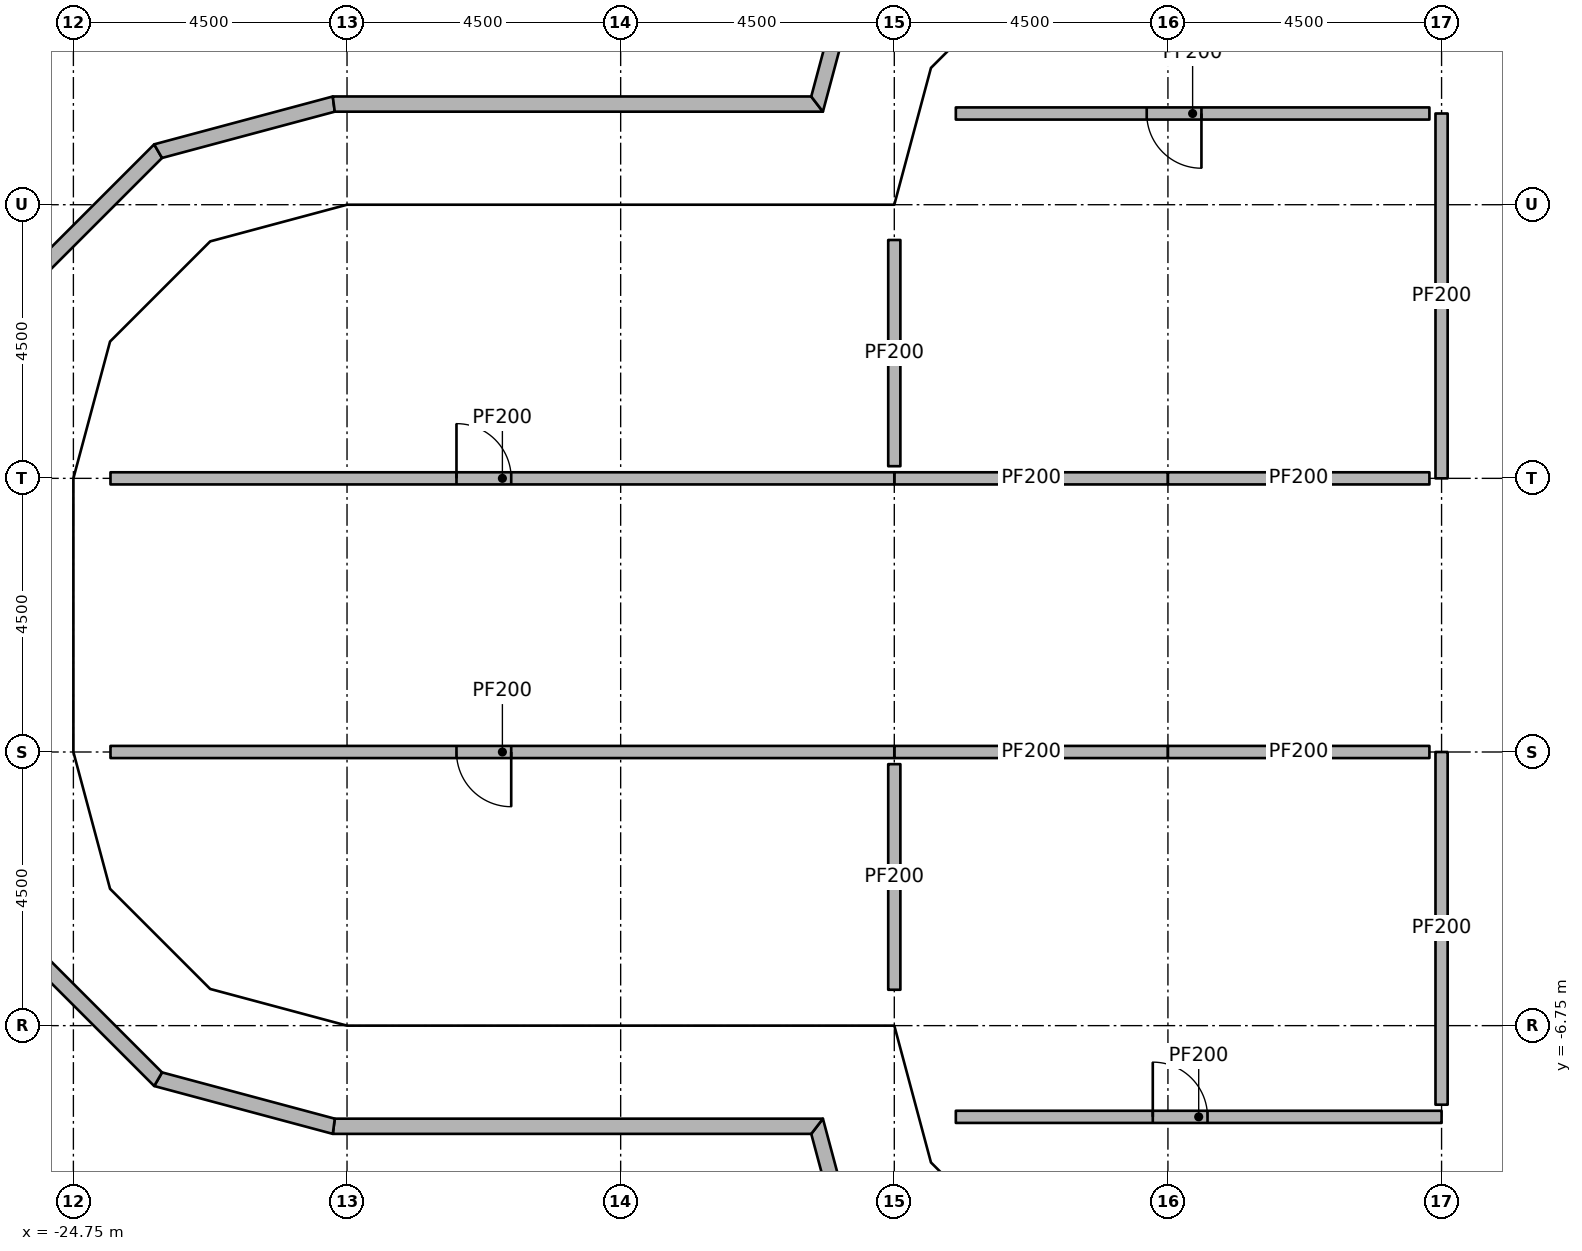
"""IFC4 building model, lengths in metres.
Left out: names, types, materials, properties, quantities, classifications, styles, units other than length and angle.
Written with IfcOpenShell. Run it as: python <this file> out.ifc"""

import sys

from ifc_helpers import new_model, si_unit, direction, frame, frame_2d, origin, origin_2d, place, context, subcontext, project, spatial, polyline, rectangle, outline, extrude, element, fill, save


model = new_model("IFC4")
c1 = context("Model", 3, precision=1e-05, world=origin(), true_north=direction((0.0, 1.0)))
c2 = subcontext(c1, "Body", "Model", "MODEL_VIEW")
j1 = project(units=[si_unit("LENGTHUNIT", "METRE"), si_unit("PLANEANGLEUNIT", "RADIAN")], contexts=[c1])
p1 = place(None, origin())
s1 = spatial("IfcSite", under=j1, at=p1, CompositionType="ELEMENT")
p2 = place(p1, origin())
s2 = spatial("IfcBuilding", under=s1, at=p2, CompositionType="ELEMENT")
p3 = place(p2, frame((0.0, 0.0, 295.2)))
s3 = spatial("IfcBuildingStorey", under=s2, at=p3, CompositionType="ELEMENT", Elevation=295.2)
for number, where, z_axis, x_axis in (
    (1, (-20.25, -6.11, 0.0), (0.0, 0.0, 1.0), (1.0, 0.0, 0.0)),
    (2, (-20.25, 6.11, 0.0), (0.0, 0.0, 1.0), (1.0, 0.0, 0.0)),
    (3, (-15.75, -6.25, 0.0), (0.0, 0.0, 1.0), (1.0, 0.0, 0.0)),
    (4, (-15.75, 6.25, 0.0), (0.0, 0.0, 1.0), (1.0, 0.0, 0.0)),
    (5, (-10.75, -6.25, 0.0), (0.0, 0.0, 1.0), (1.0, 0.0, 0.0)),
    (6, (-10.75, 6.25, 0.0), (0.0, 0.0, 1.0), (1.0, 0.0, 0.0)),
    (7, (-6.25, -6.25, 0.0), (0.0, 0.0, 1.0), (1.0, 0.0, 0.0)),
    (8, (-6.25, 6.25, 0.0), (0.0, 0.0, 1.0), (1.0, 0.0, 0.0)),
):
    element("IfcColumn", number, at=place(p3, frame(where, z_axis=z_axis, x_axis=x_axis)), inside=s3, PredefinedType="COLUMN", context=c2, shape_type="SweptSolid", body=[
        extrude(rectangle(XDim=0.6, YDim=0.6, at=origin_2d()), origin(), (0.0, 0.0, 1.0), 3.45),
    ])
p4 = place(p3, origin())
e9 = element("IfcWall", 9, at=p4, inside=s3, PredefinedType="PARAPET", context=c2, shape_type="SweptSolid", body=[
    extrude(outline(polyline([(-12.243, -9.921), (-12.616, -8.53), (-12.424, -8.28), (-12.019, -9.792), (-12.243, -9.921)])), origin(), (0.0, 0.0, 1.0), 1.22),
])
p5 = place(p3, origin())
e10 = element("IfcWall", 10, at=p5, inside=s3, PredefinedType="PARAPET", context=c2, shape_type="SweptSolid", body=[
    extrude(outline(polyline([(-12.616, -8.53), (-20.484, -8.53), (-20.451, -8.28), (-12.424, -8.28), (-12.616, -8.53)])), origin(), (0.0, 0.0, 1.0), 1.22),
])
p6 = place(p3, origin())
e11 = element("IfcWall", 11, at=p6, inside=s3, PredefinedType="PARAPET", context=c2, shape_type="SweptSolid", body=[
    extrude(outline(polyline([(-20.484, -8.53), (-23.421, -7.743), (-23.292, -7.519), (-20.451, -8.28), (-20.484, -8.53)])), origin(), (0.0, 0.0, 1.0), 1.22),
])
p7 = place(p3, origin())
e12 = element("IfcWall", 12, at=p7, inside=s3, PredefinedType="PARAPET", context=c2, shape_type="SweptSolid", body=[
    extrude(outline(polyline([(-23.421, -7.743), (-25.743, -5.421), (-25.519, -5.292), (-23.292, -7.519), (-23.421, -7.743)])), origin(), (0.0, 0.0, 1.0), 1.22),
])
p8 = place(p3, origin())
e13 = element("IfcWall", 13, at=p8, inside=s3, PredefinedType="PARAPET", context=c2, shape_type="SweptSolid", body=[
    extrude(outline(polyline([(-25.743, 5.421), (-23.421, 7.743), (-23.292, 7.519), (-25.519, 5.292), (-25.743, 5.421)])), origin(), (0.0, 0.0, 1.0), 1.22),
])
p9 = place(p3, origin())
e14 = element("IfcWall", 14, at=p9, inside=s3, PredefinedType="PARAPET", context=c2, shape_type="SweptSolid", body=[
    extrude(outline(polyline([(-23.421, 7.743), (-20.484, 8.53), (-20.451, 8.28), (-23.292, 7.519), (-23.421, 7.743)])), origin(), (0.0, 0.0, 1.0), 1.22),
])
p10 = place(p3, origin())
e15 = element("IfcWall", 15, at=p10, inside=s3, PredefinedType="PARAPET", context=c2, shape_type="SweptSolid", body=[
    extrude(outline(polyline([(-20.484, 8.53), (-12.616, 8.53), (-12.424, 8.28), (-20.451, 8.28), (-20.484, 8.53)])), origin(), (0.0, 0.0, 1.0), 1.22),
])
p11 = place(p3, origin())
e16 = element("IfcWall", 16, at=p11, inside=s3, PredefinedType="PARAPET", context=c2, shape_type="SweptSolid", body=[
    extrude(outline(polyline([(-12.616, 8.53), (-12.243, 9.921), (-12.019, 9.792), (-12.424, 8.28), (-12.616, 8.53)])), origin(), (0.0, 0.0, 1.0), 1.22),
])
p12 = place(p3, frame((-2.25, 2.25, 0.0), z_axis=(0.0, 0.0, 1.0), x_axis=(0.0, 1.0, 0.0)))
e17 = element("IfcWall", 17, at=p12, inside=s3, PredefinedType="PARTITIONING", context=c2, shape_type="SweptSolid", body=[
    extrude(rectangle(XDim=6.0, YDim=0.2, at=frame_2d((3.0, 0.0))), origin(), (0.0, 0.0, 1.0), 2.681),
])
p13 = place(p3, frame((-2.45, 8.25, 0.0), z_axis=(0.0, 0.0, 1.0), x_axis=(-1.0, 0.0, 0.0)))
e18 = element("IfcWall", 18, at=p13, inside=s3, PredefinedType="PARTITIONING", context=c2, shape_type="SweptSolid", body=[
    extrude(rectangle(XDim=7.788, YDim=0.2, at=frame_2d((3.894, 0.0))), origin(), (0.0, 0.0, 1.0), 3.45),
])
p14 = place(p13, frame((3.749, 0.0, 0.0)))
e19 = element("IfcOpeningElement", 19, at=p14, cuts=e18, PredefinedType="OPENING", context=c2, shape_type="SweptSolid", body=[
    extrude(rectangle(XDim=0.9, YDim=2.1, at=frame_2d((0.45, 1.05))), frame((0.0, 0.11, 0.0), z_axis=(0.0, -1.0, 0.0), x_axis=(1.0, 0.0, 0.0)), (0.0, 0.0, 1.0), 0.22),
])
p15 = place(p3, frame((-10.238, -8.25, 0.0), z_axis=(0.0, 0.0, 1.0), x_axis=(1.0, 0.0, 0.0)))
e20 = element("IfcWall", 20, at=p15, inside=s3, PredefinedType="PARTITIONING", context=c2, shape_type="SweptSolid", body=[
    extrude(rectangle(XDim=7.988, YDim=0.2, at=frame_2d((3.994, 0.0))), origin(), (0.0, 0.0, 1.0), 3.45),
])
p16 = place(p15, frame((3.239, 0.0, 0.0)))
e21 = element("IfcOpeningElement", 21, at=p16, cuts=e20, PredefinedType="OPENING", context=c2, shape_type="SweptSolid", body=[
    extrude(rectangle(XDim=0.9, YDim=2.1, at=frame_2d((0.45, 1.05))), frame((0.0, 0.11, 0.0), z_axis=(0.0, -1.0, 0.0), x_axis=(1.0, 0.0, 0.0)), (0.0, 0.0, 1.0), 0.22),
])
p17 = place(p3, frame((-2.25, -8.05, 0.0), z_axis=(0.0, 0.0, 1.0), x_axis=(0.0, 1.0, 0.0)))
e22 = element("IfcWall", 22, at=p17, inside=s3, PredefinedType="PARTITIONING", context=c2, shape_type="SweptSolid", body=[
    extrude(rectangle(XDim=5.8, YDim=0.2, at=frame_2d((2.9, 0.0))), origin(), (0.0, 0.0, 1.0), 2.681),
])
p18 = place(p3, frame((-6.75, 2.25, 0.0), z_axis=(0.0, 0.0, 1.0), x_axis=(-1.0, 0.0, 0.0)))
e23 = element("IfcWall", 23, at=p18, inside=s3, PredefinedType="PARTITIONING", context=c2, shape_type="SweptSolid", body=[
    extrude(rectangle(XDim=4.5, YDim=0.2, at=frame_2d((2.25, 0.0))), origin(), (0.0, 0.0, 1.0), 2.53),
])
p19 = place(p3, frame((-11.25, 2.45, 0.0), z_axis=(0.0, 0.0, 1.0), x_axis=(0.0, 1.0, 0.0)))
e24 = element("IfcWall", 24, at=p19, inside=s3, PredefinedType="PARTITIONING", context=c2, shape_type="SweptSolid", body=[
    extrude(rectangle(XDim=3.72, YDim=0.2, at=frame_2d((1.86, 0.0))), origin(), (0.0, 0.0, 1.0), 3.45),
])
p20 = place(p3, frame((-2.45, 2.25, 0.0), z_axis=(0.0, 0.0, 1.0), x_axis=(-1.0, 0.0, 0.0)))
e25 = element("IfcWall", 25, at=p20, inside=s3, PredefinedType="PARTITIONING", context=c2, shape_type="SweptSolid", body=[
    extrude(rectangle(XDim=4.3, YDim=0.2, at=frame_2d((2.15, 0.0))), origin(), (0.0, 0.0, 1.0), 2.828),
])
p21 = place(p3, frame((-11.25, -2.25, 0.0), z_axis=(0.0, 0.0, 1.0), x_axis=(1.0, 0.0, 0.0)))
e26 = element("IfcWall", 26, at=p21, inside=s3, PredefinedType="PARTITIONING", context=c2, shape_type="SweptSolid", body=[
    extrude(rectangle(XDim=4.5, YDim=0.2, at=frame_2d((2.25, 0.0))), origin(), (0.0, 0.0, 1.0), 2.53),
])
p22 = place(p3, frame((-11.25, -6.16, 0.0), z_axis=(0.0, 0.0, 1.0), x_axis=(0.0, 1.0, 0.0)))
e27 = element("IfcWall", 27, at=p22, inside=s3, PredefinedType="PARTITIONING", context=c2, shape_type="SweptSolid", body=[
    extrude(rectangle(XDim=3.71, YDim=0.2, at=frame_2d((1.855, 0.0))), origin(), (0.0, 0.0, 1.0), 3.45),
])
p23 = place(p3, frame((-6.75, -2.25, 0.0), z_axis=(0.0, 0.0, 1.0), x_axis=(1.0, 0.0, 0.0)))
e28 = element("IfcWall", 28, at=p23, inside=s3, PredefinedType="PARTITIONING", context=c2, shape_type="SweptSolid", body=[
    extrude(rectangle(XDim=4.3, YDim=0.2, at=frame_2d((2.15, 0.0))), origin(), (0.0, 0.0, 1.0), 2.828),
])
p24 = place(p3, frame((-24.14, 2.25, 0.0), z_axis=(0.0, 0.0, 1.0), x_axis=(1.0, 0.0, 0.0)))
e29 = element("IfcWall", 29, at=p24, inside=s3, PredefinedType="PARTITIONING", context=c2, shape_type="SweptSolid", body=[
    extrude(rectangle(XDim=12.89, YDim=0.2, at=frame_2d((6.445, 0.0))), origin(), (0.0, 0.0, 1.0), 3.45),
])
p25 = place(p24, frame((5.69, 0.0, 0.0)))
e30 = element("IfcOpeningElement", 30, at=p25, cuts=e29, PredefinedType="OPENING", context=c2, shape_type="SweptSolid", body=[
    extrude(rectangle(XDim=0.9, YDim=2.1, at=frame_2d((0.45, 1.05))), frame((0.0, 0.11, 0.0), z_axis=(0.0, -1.0, 0.0), x_axis=(1.0, 0.0, 0.0)), (0.0, 0.0, 1.0), 0.22),
])
p26 = place(p3, frame((-11.25, -2.25, 0.0), z_axis=(0.0, 0.0, 1.0), x_axis=(-1.0, 0.0, 0.0)))
e31 = element("IfcWall", 31, at=p26, inside=s3, PredefinedType="PARTITIONING", context=c2, shape_type="SweptSolid", body=[
    extrude(rectangle(XDim=12.89, YDim=0.2, at=frame_2d((6.445, 0.0))), origin(), (0.0, 0.0, 1.0), 3.45),
])
p27 = place(p26, frame((6.3, 0.0, 0.0)))
e32 = element("IfcOpeningElement", 32, at=p27, cuts=e31, PredefinedType="OPENING", context=c2, shape_type="SweptSolid", body=[
    extrude(rectangle(XDim=0.9, YDim=2.1, at=frame_2d((0.45, 1.05))), frame((0.0, 0.11, 0.0), z_axis=(0.0, -1.0, 0.0), x_axis=(1.0, 0.0, 0.0)), (0.0, 0.0, 1.0), 0.22),
])
p28 = place(p14, origin())
e33 = element("IfcDoor", 33, at=p28, inside=s3, OperationType="SINGLE_SWING_LEFT", PredefinedType="DOOR", context=c2, shape_type="SweptSolid", body=[
    extrude(rectangle(XDim=0.9, YDim=2.1, at=frame_2d((0.45, 1.05))), frame((0.0, 0.025, 0.0), z_axis=(0.0, -1.0, 0.0), x_axis=(1.0, 0.0, 0.0)), (0.0, 0.0, 1.0), 0.05),
])
fill(e19, e33)
p29 = place(p16, origin())
e34 = element("IfcDoor", 34, at=p29, inside=s3, OperationType="SINGLE_SWING_LEFT", PredefinedType="DOOR", context=c2, shape_type="SweptSolid", body=[
    extrude(rectangle(XDim=0.9, YDim=2.1, at=frame_2d((0.45, 1.05))), frame((0.0, 0.025, 0.0), z_axis=(0.0, -1.0, 0.0), x_axis=(1.0, 0.0, 0.0)), (0.0, 0.0, 1.0), 0.05),
])
fill(e21, e34)
p30 = place(p25, origin())
e35 = element("IfcDoor", 35, at=p30, inside=s3, OperationType="SINGLE_SWING_LEFT", PredefinedType="DOOR", context=c2, shape_type="SweptSolid", body=[
    extrude(rectangle(XDim=0.9, YDim=2.1, at=frame_2d((0.45, 1.05))), frame((0.0, 0.025, 0.0), z_axis=(0.0, -1.0, 0.0), x_axis=(1.0, 0.0, 0.0)), (0.0, 0.0, 1.0), 0.05),
])
fill(e30, e35)
p31 = place(p27, origin())
e36 = element("IfcDoor", 36, at=p31, inside=s3, OperationType="SINGLE_SWING_LEFT", PredefinedType="DOOR", context=c2, shape_type="SweptSolid", body=[
    extrude(rectangle(XDim=0.9, YDim=2.1, at=frame_2d((0.45, 1.05))), frame((0.0, 0.025, 0.0), z_axis=(0.0, -1.0, 0.0), x_axis=(1.0, 0.0, 0.0)), (0.0, 0.0, 1.0), 0.05),
])
fill(e32, e36)
save(model, sys.argv[1])
